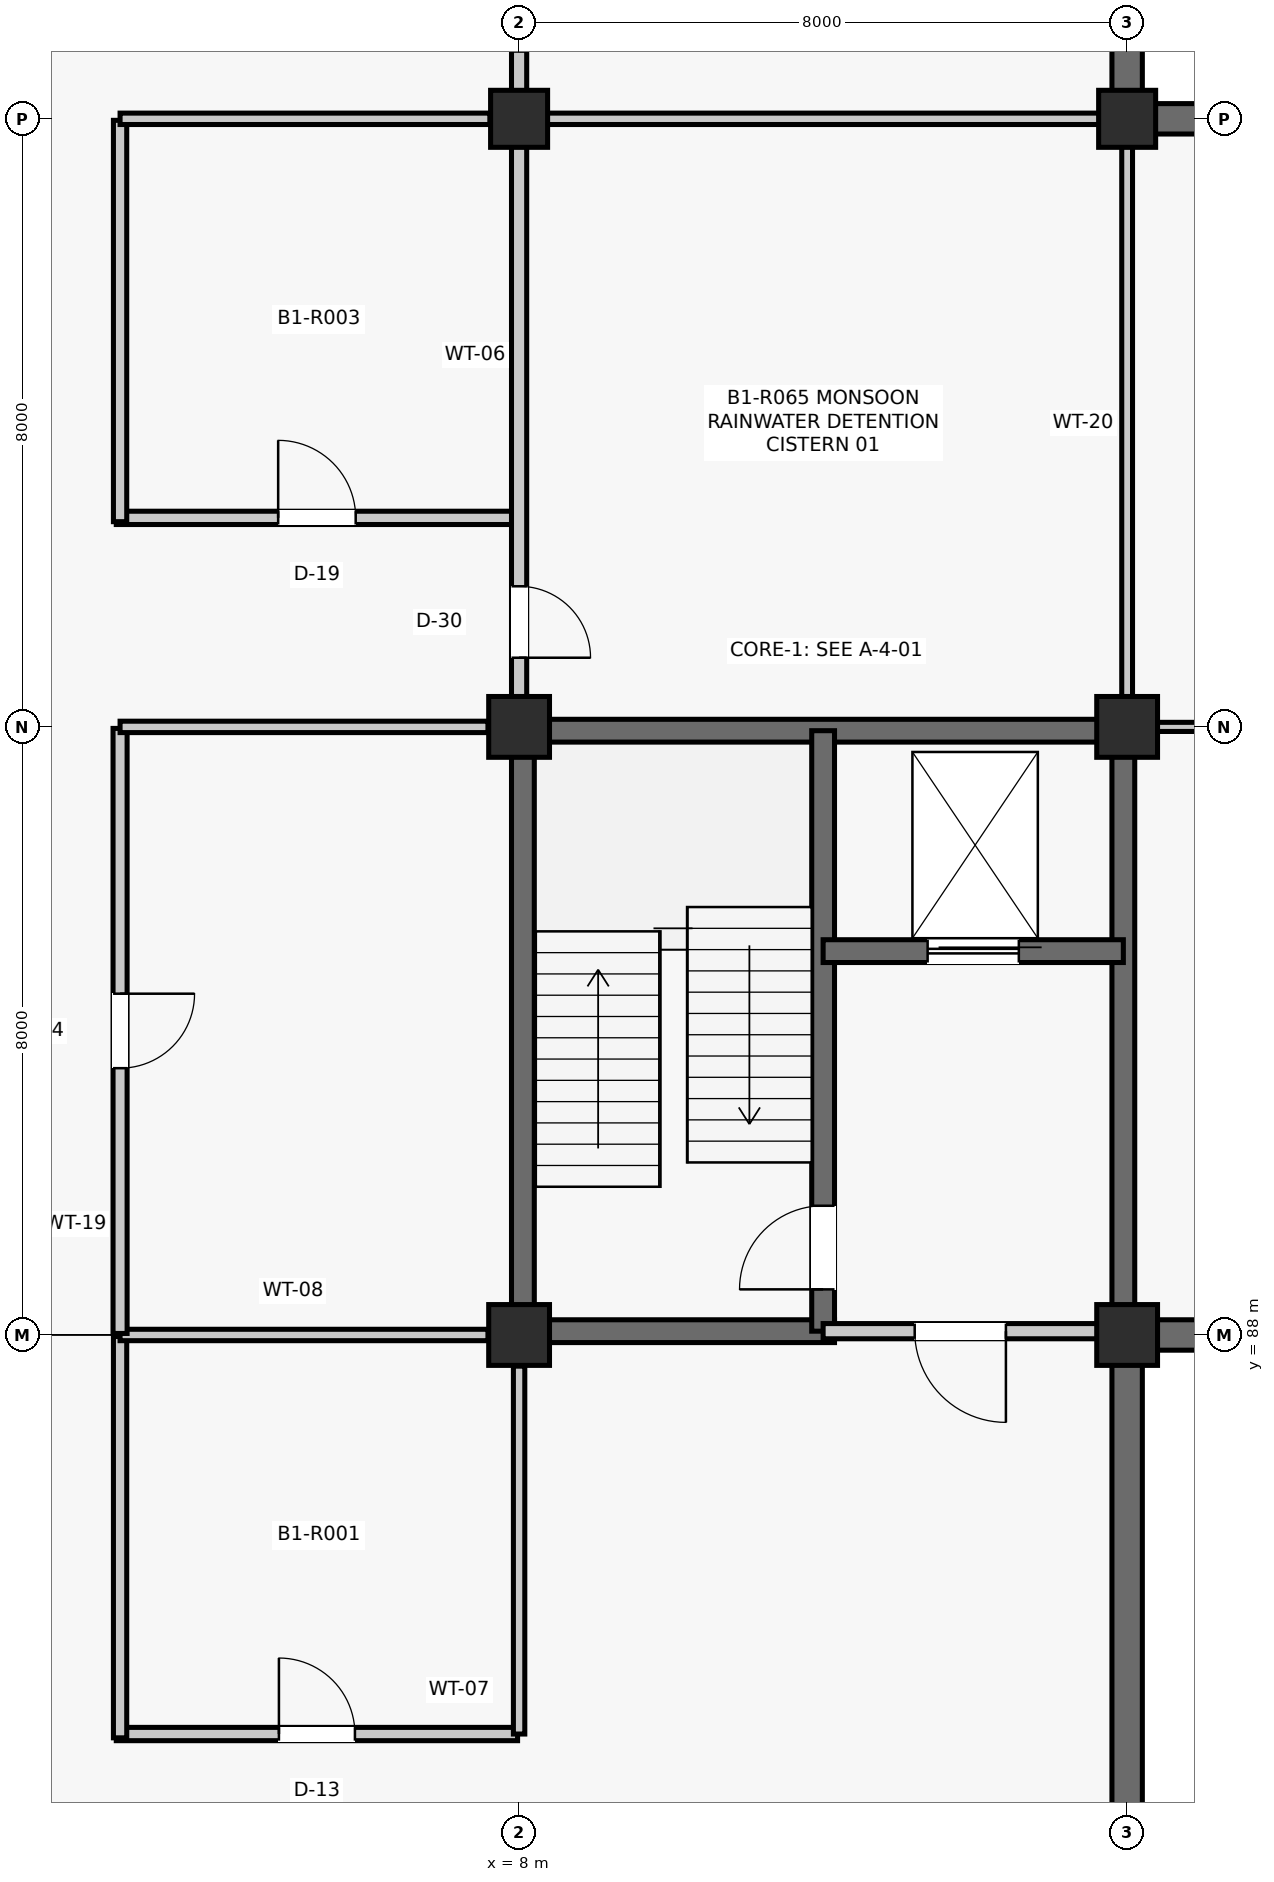
"""IFC4 building model, lengths in metres.
Left out: names, types, materials, properties, quantities, classifications, styles, units other than length and angle.
Written with IfcOpenShell. Run it as: python <this file> out.ifc"""

import sys

from ifc_helpers import new_model, si_unit, direction, frame, frame_2d, origin, origin_2d, place, context, subcontext, project, spatial, rectangle, extrude, element, fill, save


model = new_model("IFC4")
c1 = context("Model", 3, precision=1e-05, world=origin(), true_north=direction((0.0, 1.0)))
c2 = subcontext(c1, "Body", "Model", "MODEL_VIEW")
j1 = project(units=[si_unit("LENGTHUNIT", "METRE"), si_unit("PLANEANGLEUNIT", "RADIAN")], contexts=[c1])
p1 = place(None, origin())
s1 = spatial("IfcSite", under=j1, at=p1, CompositionType="ELEMENT")
p2 = place(p1, origin())
s2 = spatial("IfcBuilding", under=s1, at=p2, CompositionType="ELEMENT")
p3 = place(p2, frame((0.0, 0.0, -4.29)))
s3 = spatial("IfcBuildingStorey", under=s2, at=p3, CompositionType="ELEMENT", Elevation=-4.29)
for number, where, z_axis, x_axis in (
    (1, (8.0, 88.0, 0.0), (0.0, 0.0, 1.0), (1.0, 0.0, 0.0)),
    (2, (8.0, 96.0, 0.0), (0.0, 0.0, 1.0), (1.0, 0.0, 0.0)),
):
    element("IfcColumn", number, at=place(p3, frame(where, z_axis=z_axis, x_axis=x_axis)), inside=s3, PredefinedType="COLUMN", context=c2, shape_type="SweptSolid", body=[
        extrude(rectangle(XDim=0.8, YDim=0.8, at=origin_2d()), origin(), (0.0, 0.0, 1.0), 4.29),
    ])
p4 = place(p3, frame((8.0, 104.0, 0.0), z_axis=(0.0, 0.0, 1.0), x_axis=(1.0, 0.0, 0.0)))
e3 = element("IfcColumn", 3, at=p4, inside=s3, PredefinedType="COLUMN", context=c2, shape_type="SweptSolid", body=[
    extrude(rectangle(XDim=0.75, YDim=0.75, at=origin_2d()), origin(), (0.0, 0.0, 1.0), 4.29),
])
for number, where, z_axis, x_axis in (
    (4, (16.0, 88.0, 0.0), (0.0, 0.0, 1.0), (1.0, 0.0, 0.0)),
    (5, (16.0, 96.0, 0.0), (0.0, 0.0, 1.0), (1.0, 0.0, 0.0)),
):
    element("IfcColumn", number, at=place(p3, frame(where, z_axis=z_axis, x_axis=x_axis)), inside=s3, PredefinedType="COLUMN", context=c2, shape_type="SweptSolid", body=[
        extrude(rectangle(XDim=0.8, YDim=0.8, at=origin_2d()), origin(), (0.0, 0.0, 1.0), 4.29),
    ])
p5 = place(p3, frame((16.0, 104.0, 0.0), z_axis=(0.0, 0.0, 1.0), x_axis=(1.0, 0.0, 0.0)))
e6 = element("IfcColumn", 6, at=p5, inside=s3, PredefinedType="COLUMN", context=c2, shape_type="SweptSolid", body=[
    extrude(rectangle(XDim=0.75, YDim=0.75, at=origin_2d()), origin(), (0.0, 0.0, 1.0), 4.29),
])
p6 = place(p3, frame((16.0, 80.335, 0.0), z_axis=(0.0, 0.0, 1.0), x_axis=(0.0, 1.0, 0.0)))
e7 = element("IfcWall", 7, at=p6, inside=s3, PredefinedType="SHEAR", context=c2, shape_type="SweptSolid", body=[
    extrude(rectangle(XDim=7.28, YDim=0.4, at=frame_2d((3.64, 0.0))), origin(), (0.0, 0.0, 1.0), 3.667),
])
p7 = place(p3, frame((16.0, 104.36, 0.0), z_axis=(0.0, 0.0, 1.0), x_axis=(0.0, 1.0, 0.0)))
e8 = element("IfcWall", 8, at=p7, inside=s3, PredefinedType="SHEAR", context=c2, shape_type="SweptSolid", body=[
    extrude(rectangle(XDim=7.28, YDim=0.4, at=frame_2d((3.64, 0.0))), origin(), (0.0, 0.0, 1.0), 3.458),
])
p8 = place(p3, frame((16.385, 88.0, 0.0), z_axis=(0.0, 0.0, 1.0), x_axis=(1.0, 0.0, 0.0)))
e9 = element("IfcWall", 9, at=p8, inside=s3, PredefinedType="SHEAR", context=c2, shape_type="SweptSolid", body=[
    extrude(rectangle(XDim=7.255, YDim=0.4, at=frame_2d((3.627, 0.0))), origin(), (0.0, 0.0, 1.0), 3.59),
])
p9 = place(p3, frame((16.36, 104.0, 0.0), z_axis=(0.0, 0.0, 1.0), x_axis=(1.0, 0.0, 0.0)))
e10 = element("IfcWall", 10, at=p9, inside=s3, PredefinedType="SHEAR", context=c2, shape_type="SweptSolid", body=[
    extrude(rectangle(XDim=7.28, YDim=0.4, at=frame_2d((3.64, 0.0))), origin(), (0.0, 0.0, 1.0), 3.391),
])
for number, where, z_axis, x_axis in (
    (11, (8.05, 88.29, 0.0), (0.0, 0.0, 1.0), (0.0, 1.0, 0.0)),
    (12, (8.29, 95.95, 0.0), (0.0, 0.0, 1.0), (1.0, 0.0, 0.0)),
    (13, (15.95, 88.29, 0.0), (0.0, 0.0, 1.0), (0.0, 1.0, 0.0)),
):
    element("IfcWall", number, at=place(p3, frame(where, z_axis=z_axis, x_axis=x_axis)), inside=s3, PredefinedType="SHEAR", context=c2, shape_type="SweptSolid", body=[
        extrude(rectangle(XDim=7.42, YDim=0.3, at=frame_2d((3.71, 0.0))), origin(), (0.0, 0.0, 1.0), 4.015),
    ])
p10 = place(p3, frame((8.29, 88.05, 0.0), z_axis=(0.0, 0.0, 1.0), x_axis=(1.0, 0.0, 0.0)))
e14 = element("IfcWall", 14, at=p10, inside=s3, PredefinedType="SHEAR", context=c2, shape_type="SweptSolid", body=[
    extrude(rectangle(XDim=3.86, YDim=0.3, at=frame_2d((1.93, 0.0))), origin(), (0.0, 0.0, 1.0), 4.015),
])
p11 = place(p3, frame((12.0, 88.05, 0.0), z_axis=(0.0, 0.0, 1.0), x_axis=(0.0, 1.0, 0.0)))
e15 = element("IfcWall", 15, at=p11, inside=s3, PredefinedType="SHEAR", context=c2, shape_type="SweptSolid", body=[
    extrude(rectangle(XDim=7.9, YDim=0.3, at=frame_2d((3.95, 0.0))), origin(), (0.0, 0.0, 1.0), 4.015),
])
p12 = place(p11, frame((0.55, 0.0, 0.0)))
e16 = element("IfcOpeningElement", 16, at=p12, cuts=e15, PredefinedType="OPENING", context=c2, shape_type="SweptSolid", body=[
    extrude(rectangle(XDim=1.1, YDim=2.15, at=frame_2d((0.55, 1.075))), frame((0.0, 0.16, 0.0), z_axis=(0.0, -1.0, 0.0), x_axis=(1.0, 0.0, 0.0)), (0.0, 0.0, 1.0), 0.32),
])
p13 = place(p3, frame((12.0, 93.05, 0.0), z_axis=(0.0, 0.0, 1.0), x_axis=(1.0, 0.0, 0.0)))
e17 = element("IfcWall", 17, at=p13, inside=s3, PredefinedType="SHEAR", context=c2, shape_type="SweptSolid", body=[
    extrude(rectangle(XDim=3.95, YDim=0.3, at=frame_2d((1.975, 0.0))), origin(), (0.0, 0.0, 1.0), 4.015),
])
p14 = place(p13, frame((1.375, 0.0, 0.0)))
e18 = element("IfcOpeningElement", 18, at=p14, cuts=e17, PredefinedType="OPENING", context=c2, shape_type="SweptSolid", body=[
    extrude(rectangle(XDim=1.2, YDim=2.2, at=frame_2d((0.6, 1.1))), frame((0.0, 0.16, 0.0), z_axis=(0.0, -1.0, 0.0), x_axis=(1.0, 0.0, 0.0)), (0.0, 0.0, 1.0), 0.32),
])
p15 = place(p3, frame((12.0, 88.05, 0.0), z_axis=(0.0, 0.0, 1.0), x_axis=(1.0, 0.0, 0.0)))
e19 = element("IfcWall", 19, at=p15, inside=s3, PredefinedType="PARTITIONING", context=c2, shape_type="SweptSolid", body=[
    extrude(rectangle(XDim=3.61, YDim=0.2, at=frame_2d((1.805, 0.0))), origin(), (0.0, 0.0, 1.0), 3.307),
])
p16 = place(p15, frame((1.205, 0.0, 0.0)))
e20 = element("IfcOpeningElement", 20, at=p16, cuts=e19, PredefinedType="OPENING", context=c2, shape_type="SweptSolid", body=[
    extrude(rectangle(XDim=1.2, YDim=2.15, at=frame_2d((0.6, 1.075))), frame((0.0, 0.11, 0.0), z_axis=(0.0, -1.0, 0.0), x_axis=(1.0, 0.0, 0.0)), (0.0, 0.0, 1.0), 0.22),
])
p17 = place(p3, frame((2.7, 82.75, 0.0), z_axis=(0.0, 0.0, 1.0), x_axis=(1.0, 0.0, 0.0)))
e21 = element("IfcWall", 21, at=p17, inside=s3, PredefinedType="PARTITIONING", context=c2, shape_type="SweptSolid", body=[
    extrude(rectangle(XDim=5.28, YDim=0.175, at=frame_2d((2.64, 0.0))), origin(), (0.0, 0.0, 1.0), 3.461),
])
p18 = place(p17, frame((2.14, 0.0, 0.0)))
e22 = element("IfcOpeningElement", 22, at=p18, cuts=e21, PredefinedType="OPENING", context=c2, shape_type="SweptSolid", body=[
    extrude(rectangle(XDim=1.0, YDim=2.15, at=frame_2d((0.5, 1.075))), frame((0.0, 0.097, 0.0), z_axis=(0.0, -1.0, 0.0), x_axis=(1.0, 0.0, 0.0)), (0.0, 0.0, 1.0), 0.195),
])
p19 = place(p3, frame((2.75, 82.7, 0.0), z_axis=(0.0, 0.0, 1.0), x_axis=(0.0, 1.0, 0.0)))
e23 = element("IfcWall", 23, at=p19, inside=s3, PredefinedType="PARTITIONING", context=c2, shape_type="SweptSolid", body=[
    extrude(rectangle(XDim=5.28, YDim=0.175, at=frame_2d((2.64, 0.0))), origin(), (0.0, 0.0, 1.0), 3.384),
])
p20 = place(p3, frame((2.75, 88.0, 0.0), z_axis=(0.0, 0.0, 1.0), x_axis=(1.0, 0.0, 0.0)))
e24 = element("IfcWall", 24, at=p20, inside=s3, PredefinedType="PARTITIONING", context=c2, shape_type="SweptSolid", body=[
    extrude(rectangle(XDim=4.84, YDim=0.15, at=frame_2d((2.42, 0.0))), origin(), (0.0, 0.0, 1.0), 3.384),
])
p21 = place(p3, frame((8.0, 82.75, 0.0), z_axis=(0.0, 0.0, 1.0), x_axis=(0.0, 1.0, 0.0)))
e25 = element("IfcWall", 25, at=p21, inside=s3, PredefinedType="PARTITIONING", context=c2, shape_type="SweptSolid", body=[
    extrude(rectangle(XDim=4.84, YDim=0.15, at=frame_2d((2.42, 0.0))), origin(), (0.0, 0.0, 1.0), 3.461),
])
p22 = place(p3, frame((2.75, 88.02, 0.0), z_axis=(0.0, 0.0, 1.0), x_axis=(0.0, 1.0, 0.0)))
e26 = element("IfcWall", 26, at=p22, inside=s3, PredefinedType="PARTITIONING", context=c2, shape_type="SweptSolid", body=[
    extrude(rectangle(XDim=7.96, YDim=0.185, at=frame_2d((3.98, 0.0))), origin(), (0.0, 0.0, 1.0), 3.307),
])
p23 = place(p22, frame((3.49, 0.0, 0.0)))
e27 = element("IfcOpeningElement", 27, at=p23, cuts=e26, PredefinedType="OPENING", context=c2, shape_type="SweptSolid", body=[
    extrude(rectangle(XDim=0.98, YDim=2.15, at=frame_2d((0.49, 1.075))), frame((0.0, 0.103, 0.0), z_axis=(0.0, -1.0, 0.0), x_axis=(1.0, 0.0, 0.0)), (0.0, 0.0, 1.0), 0.205),
])
p24 = place(p3, frame((2.75, 96.0, 0.0), z_axis=(0.0, 0.0, 1.0), x_axis=(1.0, 0.0, 0.0)))
e28 = element("IfcWall", 28, at=p24, inside=s3, PredefinedType="PARTITIONING", context=c2, shape_type="SweptSolid", body=[
    extrude(rectangle(XDim=4.84, YDim=0.15, at=frame_2d((2.42, 0.0))), origin(), (0.0, 0.0, 1.0), 3.307),
])
p25 = place(p3, frame((2.7, 98.75, 0.0), z_axis=(0.0, 0.0, 1.0), x_axis=(1.0, 0.0, 0.0)))
e29 = element("IfcWall", 29, at=p25, inside=s3, PredefinedType="PARTITIONING", context=c2, shape_type="SweptSolid", body=[
    extrude(rectangle(XDim=5.28, YDim=0.175, at=frame_2d((2.64, 0.0))), origin(), (0.0, 0.0, 1.0), 3.392),
])
p26 = place(p25, frame((2.13, 0.0, 0.0)))
e30 = element("IfcOpeningElement", 30, at=p26, cuts=e29, PredefinedType="OPENING", context=c2, shape_type="SweptSolid", body=[
    extrude(rectangle(XDim=1.02, YDim=2.2, at=frame_2d((0.51, 1.1))), frame((0.0, 0.097, 0.0), z_axis=(0.0, -1.0, 0.0), x_axis=(1.0, 0.0, 0.0)), (0.0, 0.0, 1.0), 0.195),
])
p27 = place(p3, frame((2.75, 98.7, 0.0), z_axis=(0.0, 0.0, 1.0), x_axis=(0.0, 1.0, 0.0)))
e31 = element("IfcWall", 31, at=p27, inside=s3, PredefinedType="PARTITIONING", context=c2, shape_type="SweptSolid", body=[
    extrude(rectangle(XDim=5.28, YDim=0.175, at=frame_2d((2.64, 0.0))), origin(), (0.0, 0.0, 1.0), 3.383),
])
p28 = place(p3, frame((2.75, 104.0, 0.0), z_axis=(0.0, 0.0, 1.0), x_axis=(1.0, 0.0, 0.0)))
e32 = element("IfcWall", 32, at=p28, inside=s3, PredefinedType="PARTITIONING", context=c2, shape_type="SweptSolid", body=[
    extrude(rectangle(XDim=4.865, YDim=0.15, at=frame_2d((2.433, 0.0))), origin(), (0.0, 0.0, 1.0), 3.383),
])
p29 = place(p3, frame((8.0, 96.39, 0.0), z_axis=(0.0, 0.0, 1.0), x_axis=(0.0, 1.0, 0.0)))
e33 = element("IfcWall", 33, at=p29, inside=s3, PredefinedType="PARTITIONING", context=c2, shape_type="SweptSolid", body=[
    extrude(rectangle(XDim=7.245, YDim=0.2, at=frame_2d((3.623, 0.0))), origin(), (0.0, 0.0, 1.0), 3.392),
])
p30 = place(p29, frame((0.52, 0.0, 0.0)))
e34 = element("IfcOpeningElement", 34, at=p30, cuts=e33, PredefinedType="OPENING", context=c2, shape_type="SweptSolid", body=[
    extrude(rectangle(XDim=0.94, YDim=2.12, at=frame_2d((0.47, 1.06))), frame((0.0, 0.11, 0.0), z_axis=(0.0, -1.0, 0.0), x_axis=(1.0, 0.0, 0.0)), (0.0, 0.0, 1.0), 0.22),
])
p31 = place(p3, frame((8.0, 104.365, 0.0), z_axis=(0.0, 0.0, 1.0), x_axis=(0.0, 1.0, 0.0)))
e35 = element("IfcWall", 35, at=p31, inside=s3, PredefinedType="PARTITIONING", context=c2, shape_type="SweptSolid", body=[
    extrude(rectangle(XDim=7.27, YDim=0.2, at=frame_2d((3.635, 0.0))), origin(), (0.0, 0.0, 1.0), 3.384),
])
p32 = place(p31, frame((0.52, 0.0, 0.0)))
e36 = element("IfcOpeningElement", 36, at=p32, cuts=e35, PredefinedType="OPENING", context=c2, shape_type="SweptSolid", body=[
    extrude(rectangle(XDim=0.94, YDim=2.12, at=frame_2d((0.47, 1.06))), frame((0.0, 0.11, 0.0), z_axis=(0.0, -1.0, 0.0), x_axis=(1.0, 0.0, 0.0)), (0.0, 0.0, 1.0), 0.22),
])
p33 = place(p3, frame((16.0, 96.39, 0.0), z_axis=(0.0, 0.0, 1.0), x_axis=(0.0, 1.0, 0.0)))
e37 = element("IfcWall", 37, at=p33, inside=s3, PredefinedType="PARTITIONING", context=c2, shape_type="SweptSolid", body=[
    extrude(rectangle(XDim=7.245, YDim=0.142, at=frame_2d((3.623, 0.0))), origin(), (0.0, 0.0, 1.0), 3.384),
])
p34 = place(p3, frame((8.365, 104.0, 0.0), z_axis=(0.0, 0.0, 1.0), x_axis=(1.0, 0.0, 0.0)))
e38 = element("IfcWall", 38, at=p34, inside=s3, PredefinedType="PARTITIONING", context=c2, shape_type="SweptSolid", body=[
    extrude(rectangle(XDim=7.27, YDim=0.15, at=frame_2d((3.635, 0.0))), origin(), (0.0, 0.0, 1.0), 3.316),
])
p35 = place(p3, frame((16.39, 96.0, 0.0), z_axis=(0.0, 0.0, 1.0), x_axis=(1.0, 0.0, 0.0)))
e39 = element("IfcWall", 39, at=p35, inside=s3, PredefinedType="PARTITIONING", context=c2, shape_type="SweptSolid", body=[
    extrude(rectangle(XDim=7.245, YDim=0.12, at=frame_2d((3.623, 0.0))), origin(), (0.0, 0.0, 1.0), 3.316),
])
p36 = place(p12, origin())
e40 = element("IfcDoor", 40, at=p36, inside=s3, OperationType="SINGLE_SWING_LEFT", PredefinedType="DOOR", context=c2, shape_type="SweptSolid", body=[
    extrude(rectangle(XDim=1.1, YDim=2.15, at=frame_2d((0.55, 1.075))), frame((0.0, 0.025, 0.0), z_axis=(0.0, -1.0, 0.0), x_axis=(1.0, 0.0, 0.0)), (0.0, 0.0, 1.0), 0.05),
])
fill(e16, e40)
p37 = place(p14, origin())
e41 = element("IfcDoor", 41, at=p37, inside=s3, OperationType="SLIDING_TO_LEFT", PredefinedType="DOOR", context=c2, shape_type="SweptSolid", body=[
    extrude(rectangle(XDim=1.2, YDim=2.2, at=frame_2d((0.6, 1.1))), frame((0.0, 0.025, 0.0), z_axis=(0.0, -1.0, 0.0), x_axis=(1.0, 0.0, 0.0)), (0.0, 0.0, 1.0), 0.05),
])
fill(e18, e41)
p38 = place(p16, frame((1.2, 0.0, 0.0), z_axis=(0.0, 0.0, 1.0), x_axis=(-1.0, 0.0, 0.0)))
e42 = element("IfcDoor", 42, at=p38, inside=s3, OperationType="SINGLE_SWING_RIGHT", PredefinedType="DOOR", context=c2, shape_type="SweptSolid", body=[
    extrude(rectangle(XDim=1.2, YDim=2.15, at=frame_2d((0.6, 1.075))), frame((0.0, 0.025, 0.0), z_axis=(0.0, -1.0, 0.0), x_axis=(1.0, 0.0, 0.0)), (0.0, 0.0, 1.0), 0.05),
])
fill(e20, e42)
p39 = place(p18, origin())
e43 = element("IfcDoor", 43, at=p39, inside=s3, OperationType="SINGLE_SWING_LEFT", PredefinedType="DOOR", context=c2, shape_type="SweptSolid", body=[
    extrude(rectangle(XDim=1.0, YDim=2.15, at=frame_2d((0.5, 1.075))), frame((0.0, 0.025, 0.0), z_axis=(0.0, -1.0, 0.0), x_axis=(1.0, 0.0, 0.0)), (0.0, 0.0, 1.0), 0.05),
])
fill(e22, e43)
p40 = place(p23, frame((0.98, 0.0, 0.0), z_axis=(0.0, 0.0, 1.0), x_axis=(-1.0, 0.0, 0.0)))
e44 = element("IfcDoor", 44, at=p40, inside=s3, OperationType="SINGLE_SWING_RIGHT", PredefinedType="DOOR", context=c2, shape_type="SweptSolid", body=[
    extrude(rectangle(XDim=0.98, YDim=2.15, at=frame_2d((0.49, 1.075))), frame((0.0, 0.025, 0.0), z_axis=(0.0, -1.0, 0.0), x_axis=(1.0, 0.0, 0.0)), (0.0, 0.0, 1.0), 0.05),
])
fill(e27, e44)
p41 = place(p26, origin())
e45 = element("IfcDoor", 45, at=p41, inside=s3, OperationType="SINGLE_SWING_LEFT", PredefinedType="DOOR", context=c2, shape_type="SweptSolid", body=[
    extrude(rectangle(XDim=1.02, YDim=2.2, at=frame_2d((0.51, 1.1))), frame((0.0, 0.025, 0.0), z_axis=(0.0, -1.0, 0.0), x_axis=(1.0, 0.0, 0.0)), (0.0, 0.0, 1.0), 0.05),
])
fill(e30, e45)
p42 = place(p30, frame((0.94, 0.0, 0.0), z_axis=(0.0, 0.0, 1.0), x_axis=(-1.0, 0.0, 0.0)))
e46 = element("IfcDoor", 46, at=p42, inside=s3, OperationType="SINGLE_SWING_LEFT", PredefinedType="DOOR", context=c2, shape_type="SweptSolid", body=[
    extrude(rectangle(XDim=0.94, YDim=2.12, at=frame_2d((0.47, 1.06))), frame((0.0, 0.025, 0.0), z_axis=(0.0, -1.0, 0.0), x_axis=(1.0, 0.0, 0.0)), (0.0, 0.0, 1.0), 0.05),
])
fill(e34, e46)
save(model, sys.argv[1])
